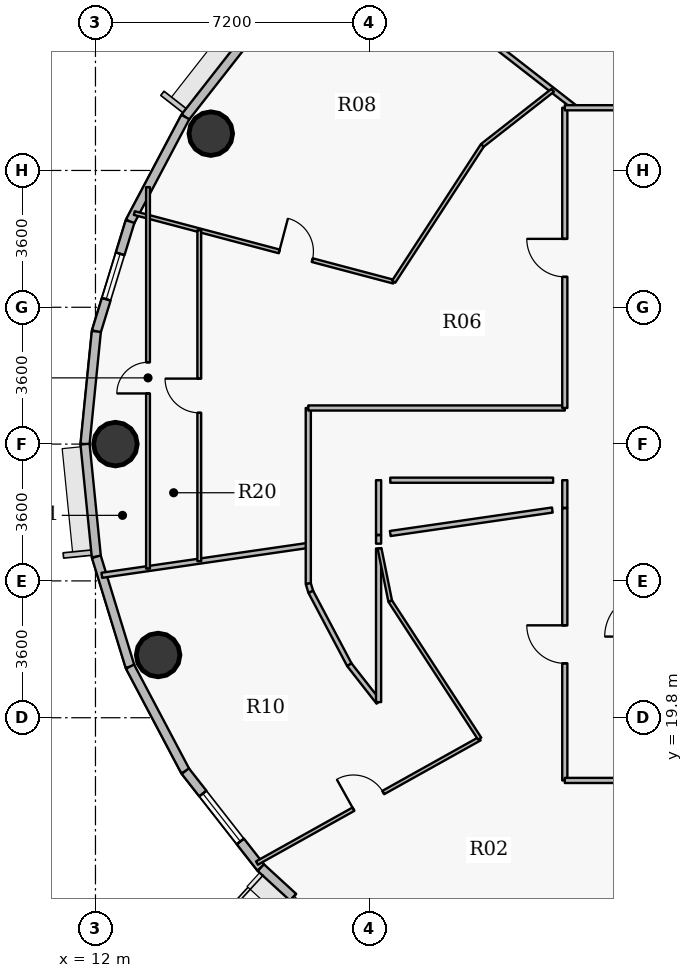
"""IFC4 building model, lengths in metres.
Left out: names, types, materials, properties, quantities, classifications, styles, units other than length and angle.
Written with IfcOpenShell. Run it as: python <this file> out.ifc"""

import sys

from ifc_helpers import new_model, si_unit, direction, frame, frame_2d, origin, origin_2d, place, context, subcontext, project, spatial, rectangle, hollow_circle, extrude, source, transform, mapped, element, fill, save


model = new_model("IFC4")
c1 = context("Model", 3, precision=1e-05, world=origin(), true_north=direction((0.0, 1.0)))
c2 = subcontext(c1, "Body", "Model", "MODEL_VIEW")
j1 = project(units=[si_unit("LENGTHUNIT", "METRE"), si_unit("PLANEANGLEUNIT", "RADIAN")], contexts=[c1])
p1 = place(None, origin())
s1 = spatial("IfcSite", under=j1, at=p1, CompositionType="ELEMENT")
p2 = place(p1, origin())
s2 = spatial("IfcBuilding", under=s1, at=p2, CompositionType="ELEMENT")
p3 = place(p2, frame((0.0, 0.0, 240.3)))
s3 = spatial("IfcBuildingStorey", under=s2, at=p3, CompositionType="ELEMENT", Elevation=240.3)
for number, where, z_axis, x_axis in (
    (1, (15.035, 35.169, 0.0), (0.0, 0.0, 1.0), (1.0, 0.0, 0.0)),
    (2, (12.525, 27.0, 0.0), (0.0, 0.0, 1.0), (1.0, 0.0, 0.0)),
    (3, (13.649, 21.451, 0.0), (0.0, 0.0, 1.0), (1.0, 0.0, 0.0)),
):
    element("IfcColumn", number, at=place(p3, frame(where, z_axis=z_axis, x_axis=x_axis)), inside=s3, PredefinedType="COLUMN", context=c2, shape_type="SweptSolid", body=[
        extrude(hollow_circle(Radius=0.575, WallThickness=0.036, at=origin_2d()), origin(), (0.0, 0.0, 1.0), 3.75),
    ])
p4 = place(p3, frame((14.364, 35.605, 0.0), z_axis=(0.0, 0.0, 1.0), x_axis=(0.616312344705, 0.787501805562, 0.0)))
e4 = element("IfcWall", 4, at=p4, inside=s3, PredefinedType="SOLIDWALL", context=c2, shape_type="SweptSolid", body=[
    extrude(rectangle(XDim=3.225, YDim=0.24, at=frame_2d((1.612, 0.0))), origin(), (0.0, 0.0, 1.0), 3.5),
])
p5 = place(p3, frame((12.91, 32.856, 0.0), z_axis=(0.0, 0.0, 1.0), x_axis=(0.46766049993, 0.883908172157, 0.0)))
e5 = element("IfcWall", 5, at=p5, inside=s3, PredefinedType="SOLIDWALL", context=c2, shape_type="SweptSolid", body=[
    extrude(rectangle(XDim=3.11, YDim=0.24, at=frame_2d((1.555, 0.0))), origin(), (0.0, 0.0, 1.0), 3.5),
])
p6 = place(p3, frame((12.023, 29.964, 0.0), z_axis=(0.0, 0.0, 1.0), x_axis=(0.293132907334, 0.95607170162, 0.0)))
e6 = element("IfcWall", 6, at=p6, inside=s3, PredefinedType="SOLIDWALL", context=c2, shape_type="SweptSolid", body=[
    extrude(rectangle(XDim=3.025, YDim=0.24, at=frame_2d((1.512, 0.0))), origin(), (0.0, 0.0, 1.0), 3.5),
])
p7 = place(p6, frame((0.887, 0.0, 0.9)))
e7 = element("IfcOpeningElement", 7, at=p7, cuts=e6, PredefinedType="OPENING", context=c2, shape_type="SweptSolid", body=[
    extrude(rectangle(XDim=1.25, YDim=1.65, at=origin_2d()), frame((0.625, 0.13, 0.825), z_axis=(0.0, -1.0, 0.0), x_axis=(1.0, 0.0, 0.0)), (0.0, 0.0, 1.0), 0.26),
])
for number, where, z_axis, x_axis in (
    (8, (11.725, 27.0, 0.0), (0.0, 0.0, 1.0), (0.1, 0.995, 0.0)),
    (9, (12.023, 24.036, 0.0), (0.0, 0.0, 1.0), (-0.1, 0.995, 0.0)),
):
    element("IfcWall", number, at=place(p3, frame(where, z_axis=z_axis, x_axis=x_axis)), inside=s3, PredefinedType="SOLIDWALL", context=c2, shape_type="SweptSolid", body=[
        extrude(rectangle(XDim=2.979, YDim=0.24, at=frame_2d((1.489, 0.0))), origin(), (0.0, 0.0, 1.0), 3.5),
    ])
p8 = place(p3, frame((12.91, 21.144, 0.0), z_axis=(0.0, 0.0, 1.0), x_axis=(-0.293132907334, 0.95607170162, 0.0)))
e10 = element("IfcWall", 10, at=p8, inside=s3, PredefinedType="SOLIDWALL", context=c2, shape_type="SweptSolid", body=[
    extrude(rectangle(XDim=3.025, YDim=0.24, at=frame_2d((1.512, 0.0))), origin(), (0.0, 0.0, 1.0), 3.5),
])
p9 = place(p3, frame((14.364, 18.395, 0.0), z_axis=(0.0, 0.0, 1.0), x_axis=(-0.46766049993, 0.883908172157, 0.0)))
e11 = element("IfcWall", 11, at=p9, inside=s3, PredefinedType="SOLIDWALL", context=c2, shape_type="SweptSolid", body=[
    extrude(rectangle(XDim=3.11, YDim=0.24, at=frame_2d((1.555, 0.0))), origin(), (0.0, 0.0, 1.0), 3.5),
])
p10 = place(p3, frame((16.352, 15.855, 0.0), z_axis=(0.0, 0.0, 1.0), x_axis=(-0.616312344705, 0.787501805562, 0.0)))
e12 = element("IfcWall", 12, at=p10, inside=s3, PredefinedType="SOLIDWALL", context=c2, shape_type="SweptSolid", body=[
    extrude(rectangle(XDim=3.225, YDim=0.24, at=frame_2d((1.612, 0.0))), origin(), (0.0, 0.0, 1.0), 3.5),
])
p11 = place(p10, frame((0.876, 0.0, 0.9)))
e13 = element("IfcOpeningElement", 13, at=p11, cuts=e12, PredefinedType="OPENING", context=c2, shape_type="SweptSolid", body=[
    extrude(rectangle(XDim=1.6, YDim=1.75, at=origin_2d()), frame((0.8, 0.13, 0.875), z_axis=(0.0, -1.0, 0.0), x_axis=(1.0, 0.0, 0.0)), (0.0, 0.0, 1.0), 0.26),
])
p12 = place(p3, frame((18.824, 13.589, 0.0), z_axis=(0.0, 0.0, 1.0), x_axis=(-0.737123922599, 0.675757591694, 0.0)))
e14 = element("IfcWall", 14, at=p12, inside=s3, PredefinedType="SOLIDWALL", context=c2, shape_type="SweptSolid", body=[
    extrude(rectangle(XDim=3.354, YDim=0.24, at=frame_2d((1.677, 0.0))), origin(), (0.0, 0.0, 1.0), 3.5),
])
p13 = place(p12, frame((1.152, 0.0, 0.0)))
e15 = element("IfcOpeningElement", 15, at=p13, cuts=e14, PredefinedType="OPENING", context=c2, shape_type="SweptSolid", body=[
    extrude(rectangle(XDim=1.05, YDim=2.15, at=origin_2d()), frame((0.525, 0.13, 1.075), z_axis=(0.0, -1.0, 0.0), x_axis=(1.0, 0.0, 0.0)), (0.0, 0.0, 1.0), 0.26),
])
p14 = place(p3, frame((12.167, 23.548, 0.0), z_axis=(0.0, 0.0, 1.0), x_axis=(0.989672764262, 0.143345106921, 0.0)))
e16 = element("IfcWall", 16, at=p14, inside=s3, PredefinedType="PARTITIONING", context=c2, shape_type="SweptSolid", body=[
    extrude(rectangle(XDim=5.489, YDim=0.135, at=frame_2d((2.745, 0.0))), origin(), (0.0, 0.0, 1.0), 2.985),
])
p15 = place(p3, frame((13.022, 33.079, 0.0), z_axis=(0.0, 0.0, 1.0), x_axis=(0.966904841433, -0.255137272097, 0.0)))
e17 = element("IfcWall", 17, at=p15, inside=s3, PredefinedType="PARTITIONING", context=c2, shape_type="SweptSolid", body=[
    extrude(rectangle(XDim=0.373, YDim=0.1, at=frame_2d((0.187, 0.0))), origin(), (0.0, 0.0, 1.0), 3.5),
])
p16 = place(p3, frame((13.392, 32.981, 0.0), z_axis=(0.0, 0.0, 1.0), x_axis=(0.966739802164, -0.255761910595, 0.0)))
e18 = element("IfcWall", 18, at=p16, inside=s3, PredefinedType="PARTITIONING", context=c2, shape_type="SweptSolid", body=[
    extrude(rectangle(XDim=6.677, YDim=0.1, at=frame_2d((3.339, 0.0))), origin(), (0.0, 0.0, 1.0), 2.985),
])
p17 = place(p16, frame((3.561, 0.0, 0.0)))
e19 = element("IfcOpeningElement", 19, at=p17, cuts=e18, PredefinedType="OPENING", context=c2, shape_type="SweptSolid", body=[
    extrude(rectangle(XDim=0.9, YDim=2.1, at=origin_2d()), frame((0.45, 0.06, 1.05), z_axis=(0.0, -1.0, 0.0), x_axis=(1.0, 0.0, 0.0)), (0.0, 0.0, 1.0), 0.12),
])
p18 = place(p3, frame((13.383, 23.724, 0.0), z_axis=(0.0, 0.0, 1.0), x_axis=(0.0, 1.0, 0.0)))
e20 = element("IfcWall", 20, at=p18, inside=s3, PredefinedType="PARTITIONING", context=c2, shape_type="SweptSolid", body=[
    extrude(rectangle(XDim=10.037, YDim=0.1, at=frame_2d((5.019, 0.0))), origin(), (0.0, 0.0, 1.0), 2.935),
])
p19 = place(p18, frame((4.608, 0.0, 0.0)))
e21 = element("IfcOpeningElement", 21, at=p19, cuts=e20, PredefinedType="OPENING", context=c2, shape_type="SweptSolid", body=[
    extrude(rectangle(XDim=0.82, YDim=2.1, at=origin_2d()), frame((0.41, 0.06, 1.05), z_axis=(0.0, -1.0, 0.0), x_axis=(1.0, 0.0, 0.0)), (0.0, 0.0, 1.0), 0.12),
])
p20 = place(p3, frame((14.732, 23.919, 0.0), z_axis=(0.0, 0.0, 1.0), x_axis=(0.0, 1.0, 0.0)))
e22 = element("IfcWall", 22, at=p20, inside=s3, PredefinedType="PARTITIONING", context=c2, shape_type="SweptSolid", body=[
    extrude(rectangle(XDim=8.708, YDim=0.1, at=frame_2d((4.354, 0.0))), origin(), (0.0, 0.0, 1.0), 2.935),
])
p21 = place(p20, frame((3.904, 0.0, 0.0)))
e23 = element("IfcOpeningElement", 23, at=p21, cuts=e22, PredefinedType="OPENING", context=c2, shape_type="SweptSolid", body=[
    extrude(rectangle(XDim=0.9, YDim=2.1, at=origin_2d()), frame((0.45, 0.06, 1.05), z_axis=(0.0, -1.0, 0.0), x_axis=(1.0, 0.0, 0.0)), (0.0, 0.0, 1.0), 0.12),
])
p22 = place(p3, frame((16.25, 15.977, 0.0), z_axis=(0.0, 0.0, 1.0), x_axis=(0.87319302211, 0.487374543999, 0.0)))
e24 = element("IfcWall", 24, at=p22, inside=s3, PredefinedType="PARTITIONING", context=c2, shape_type="SweptSolid", body=[
    extrude(rectangle(XDim=6.712, YDim=0.1, at=frame_2d((3.356, 0.0))), origin(), (0.0, 0.0, 1.0), 2.985),
])
p23 = place(p22, frame((2.906, 0.0, 0.0)))
e25 = element("IfcOpeningElement", 25, at=p23, cuts=e24, PredefinedType="OPENING", context=c2, shape_type="SweptSolid", body=[
    extrude(rectangle(XDim=0.9, YDim=2.1, at=origin_2d()), frame((0.45, 0.06, 1.05), z_axis=(0.0, -1.0, 0.0), x_axis=(1.0, 0.0, 0.0)), (0.0, 0.0, 1.0), 0.12),
])
p24 = place(p3, frame((17.6, 23.328, 0.0), z_axis=(0.0, 0.0, 1.0), x_axis=(0.0, 1.0, 0.0)))
e26 = element("IfcWall", 26, at=p24, inside=s3, PredefinedType="PARTITIONING", context=c2, shape_type="SweptSolid", body=[
    extrude(rectangle(XDim=4.622, YDim=0.135, at=frame_2d((2.311, 0.0))), origin(), (0.0, 0.0, 1.0), 2.935),
])
p25 = place(p3, frame((17.6, 23.328, 0.0), z_axis=(0.0, 0.0, 1.0), x_axis=(0.292875000845, -0.956150738053, 0.0)))
e27 = element("IfcWall", 27, at=p25, inside=s3, PredefinedType="PARTITIONING", context=c2, shape_type="SweptSolid", body=[
    extrude(rectangle(XDim=0.227, YDim=0.135, at=frame_2d((0.113, 0.0))), origin(), (0.0, 0.0, 1.0), 3.5),
])
p26 = place(p3, frame((17.6, 27.95, 0.0), z_axis=(0.0, 0.0, 1.0), x_axis=(1.0, 0.0, 0.0)))
e28 = element("IfcWall", 28, at=p26, inside=s3, PredefinedType="PARTITIONING", context=c2, shape_type="SweptSolid", body=[
    extrude(rectangle(XDim=6.75, YDim=0.135, at=frame_2d((3.375, 0.0))), origin(), (0.0, 0.0, 1.0), 3.5),
])
p27 = place(p3, frame((17.667, 23.111, 0.0), z_axis=(0.0, 0.0, 1.0), x_axis=(0.467675622269, -0.883900171024, 0.0)))
e29 = element("IfcWall", 29, at=p27, inside=s3, PredefinedType="PARTITIONING", context=c2, shape_type="SweptSolid", body=[
    extrude(rectangle(XDim=2.168, YDim=0.135, at=frame_2d((1.084, 0.0))), origin(), (0.0, 0.0, 1.0), 2.935),
])
p28 = place(p3, frame((18.681, 21.194, 0.0), z_axis=(0.0, 0.0, 1.0), x_axis=(0.616239706802, -0.787558647823, 0.0)))
e30 = element("IfcWall", 30, at=p28, inside=s3, PredefinedType="PARTITIONING", context=c2, shape_type="SweptSolid", body=[
    extrude(rectangle(XDim=1.248, YDim=0.135, at=frame_2d((0.624, 0.0))), origin(), (0.0, 0.0, 1.0), 3.5),
])
p29 = place(p3, frame((18.791, 40.387, 0.0), z_axis=(0.0, 0.0, 1.0), x_axis=(0.789302404173, -0.614004653701, 0.0)))
e31 = element("IfcWall", 31, at=p29, inside=s3, PredefinedType="PARTITIONING", context=c2, shape_type="SweptSolid", body=[
    extrude(rectangle(XDim=7.39, YDim=0.135, at=frame_2d((3.695, 0.0))), origin(), (0.0, 0.0, 1.0), 2.935),
])
p30 = place(p3, frame((19.45, 20.211, 0.0), z_axis=(0.0, 0.0, 1.0), x_axis=(0.0, 1.0, 0.0)))
e32 = element("IfcWall", 32, at=p30, inside=s3, PredefinedType="PARTITIONING", context=c2, shape_type="SweptSolid", body=[
    extrude(rectangle(XDim=4.042, YDim=0.135, at=frame_2d((2.021, 0.0))), origin(), (0.0, 0.0, 1.0), 2.935),
])
p31 = place(p3, frame((19.45, 24.38, 0.0), z_axis=(0.0, 0.0, 1.0), x_axis=(0.0, 1.0, 0.0)))
e33 = element("IfcWall", 33, at=p31, inside=s3, PredefinedType="PARTITIONING", context=c2, shape_type="SweptSolid", body=[
    extrude(rectangle(XDim=0.223, YDim=0.135, at=frame_2d((0.111, 0.0))), origin(), (0.0, 0.0, 1.0), 3.5),
])
p32 = place(p3, frame((19.475, 24.256, 0.0), z_axis=(0.0, 0.0, 1.0), x_axis=(0.198203790622, -0.980160832406, 0.0)))
e34 = element("IfcWall", 34, at=p32, inside=s3, PredefinedType="PARTITIONING", context=c2, shape_type="SweptSolid", body=[
    extrude(rectangle(XDim=1.417, YDim=0.1, at=frame_2d((0.708, 0.0))), origin(), (0.0, 0.0, 1.0), 2.935),
])
p33 = place(p3, frame((19.756, 22.867, 0.0), z_axis=(0.0, 0.0, 1.0), x_axis=(0.545441385955, -0.83814896915, 0.0)))
e35 = element("IfcWall", 35, at=p33, inside=s3, PredefinedType="PARTITIONING", context=c2, shape_type="SweptSolid", body=[
    extrude(rectangle(XDim=4.318, YDim=0.1, at=frame_2d((2.159, 0.0))), origin(), (0.0, 0.0, 1.0), 2.935),
])
p34 = place(p3, frame((19.847, 31.273, 0.0), z_axis=(0.0, 0.0, 1.0), x_axis=(0.545399280946, 0.83817636828, 0.0)))
e36 = element("IfcWall", 36, at=p34, inside=s3, PredefinedType="PARTITIONING", context=c2, shape_type="SweptSolid", body=[
    extrude(rectangle(XDim=4.28, YDim=0.1, at=frame_2d((2.14, 0.0))), origin(), (0.0, 0.0, 1.0), 2.935),
])
p35 = place(p3, frame((22.182, 34.861, 0.0), z_axis=(0.0, 0.0, 1.0), x_axis=(0.78737344739, 0.616476320994, 0.0)))
e37 = element("IfcWall", 37, at=p35, inside=s3, PredefinedType="PARTITIONING", context=c2, shape_type="SweptSolid", body=[
    extrude(rectangle(XDim=2.35, YDim=0.1, at=frame_2d((1.175, 0.0))), origin(), (0.0, 0.0, 1.0), 2.935),
])
p36 = place(p3, frame((22.747, 11.154, 0.0), z_axis=(0.0, 0.0, 1.0), x_axis=(0.641565789242, 0.767068013982, 0.0)))
e38 = element("IfcWall", 38, at=p36, inside=s3, PredefinedType="PARTITIONING", context=c2, shape_type="SweptSolid", body=[
    extrude(rectangle(XDim=6.167, YDim=0.1, at=frame_2d((3.083, 0.0))), origin(), (0.0, 0.0, 1.0), 2.985),
])
p37 = place(p36, frame((2.633, 0.0, 0.0)))
e39 = element("IfcOpeningElement", 39, at=p37, cuts=e38, PredefinedType="OPENING", context=c2, shape_type="SweptSolid", body=[
    extrude(rectangle(XDim=0.9, YDim=2.1, at=origin_2d()), frame((0.45, 0.06, 1.05), z_axis=(0.0, -1.0, 0.0), x_axis=(1.0, 0.0, 0.0)), (0.0, 0.0, 1.0), 0.12),
])
p38 = place(p3, frame((24.35, 18.15, 0.0), z_axis=(0.0, 0.0, 1.0), x_axis=(0.0, 1.0, 0.0)))
e40 = element("IfcWall", 40, at=p38, inside=s3, PredefinedType="PARTITIONING", context=c2, shape_type="SweptSolid", body=[
    extrude(rectangle(XDim=7.163, YDim=0.135, at=frame_2d((3.581, 0.0))), origin(), (0.0, 0.0, 1.0), 2.935),
])
p39 = place(p38, frame((3.081, 0.0, 0.0)))
e41 = element("IfcOpeningElement", 41, at=p39, cuts=e40, PredefinedType="OPENING", context=c2, shape_type="SweptSolid", body=[
    extrude(rectangle(XDim=1.0, YDim=2.15, at=origin_2d()), frame((0.5, 0.078, 1.075), z_axis=(0.0, -1.0, 0.0), x_axis=(1.0, 0.0, 0.0)), (0.0, 0.0, 1.0), 0.155),
])
p40 = place(p3, frame((24.35, 18.15, 0.0), z_axis=(0.0, 0.0, 1.0), x_axis=(1.0, 0.0, 0.0)))
e42 = element("IfcWall", 42, at=p40, inside=s3, PredefinedType="PARTITIONING", context=c2, shape_type="SweptSolid", body=[
    extrude(rectangle(XDim=23.85, YDim=0.135, at=frame_2d((11.925, 0.0))), origin(), (0.0, 0.0, 1.0), 2.935),
])
p41 = place(p40, frame((14.838, 0.0, 0.0)))
e43 = element("IfcOpeningElement", 43, at=p41, cuts=e42, PredefinedType="OPENING", context=c2, shape_type="SweptSolid", body=[
    extrude(rectangle(XDim=1.0, YDim=2.15, at=origin_2d()), frame((0.5, 0.078, 1.075), z_axis=(0.0, -1.0, 0.0), x_axis=(1.0, 0.0, 0.0)), (0.0, 0.0, 1.0), 0.155),
])
p42 = place(p40, frame((21.472, 0.0, 0.0)))
e44 = element("IfcOpeningElement", 44, at=p42, cuts=e42, PredefinedType="OPENING", context=c2, shape_type="SweptSolid", body=[
    extrude(rectangle(XDim=1.0, YDim=2.15, at=origin_2d()), frame((0.5, 0.078, 1.075), z_axis=(0.0, -1.0, 0.0), x_axis=(1.0, 0.0, 0.0)), (0.0, 0.0, 1.0), 0.155),
])
p43 = place(p3, frame((24.35, 27.95, 0.0), z_axis=(0.0, 0.0, 1.0), x_axis=(0.0, 1.0, 0.0)))
e45 = element("IfcWall", 45, at=p43, inside=s3, PredefinedType="PARTITIONING", context=c2, shape_type="SweptSolid", body=[
    extrude(rectangle(XDim=7.9, YDim=0.135, at=frame_2d((3.95, 0.0))), origin(), (0.0, 0.0, 1.0), 2.935),
])
p44 = place(p43, frame((3.45, 0.0, 0.0)))
e46 = element("IfcOpeningElement", 46, at=p44, cuts=e45, PredefinedType="OPENING", context=c2, shape_type="SweptSolid", body=[
    extrude(rectangle(XDim=1.0, YDim=2.15, at=origin_2d()), frame((0.5, 0.078, 1.075), z_axis=(0.0, -1.0, 0.0), x_axis=(1.0, 0.0, 0.0)), (0.0, 0.0, 1.0), 0.155),
])
p45 = place(p3, frame((24.35, 35.85, 0.0), z_axis=(0.0, 0.0, 1.0), x_axis=(1.0, 0.0, 0.0)))
e47 = element("IfcWall", 47, at=p45, inside=s3, PredefinedType="PARTITIONING", context=c2, shape_type="SweptSolid", body=[
    extrude(rectangle(XDim=26.218, YDim=0.135, at=frame_2d((13.109, 0.0))), origin(), (0.0, 0.0, 1.0), 2.935),
])
p46 = place(p45, frame((3.172, 0.0, 0.0)))
e48 = element("IfcOpeningElement", 48, at=p46, cuts=e47, PredefinedType="OPENING", context=c2, shape_type="SweptSolid", body=[
    extrude(rectangle(XDim=1.0, YDim=2.15, at=origin_2d()), frame((0.5, 0.078, 1.075), z_axis=(0.0, -1.0, 0.0), x_axis=(1.0, 0.0, 0.0)), (0.0, 0.0, 1.0), 0.155),
])
p47 = place(p45, frame((18.306, 0.0, 0.0)))
e49 = element("IfcOpeningElement", 49, at=p47, cuts=e47, PredefinedType="OPENING", context=c2, shape_type="SweptSolid", body=[
    extrude(rectangle(XDim=1.0, YDim=2.15, at=origin_2d()), frame((0.5, 0.078, 1.075), z_axis=(0.0, -1.0, 0.0), x_axis=(1.0, 0.0, 0.0)), (0.0, 0.0, 1.0), 0.155),
])
p48 = place(p3, frame((19.45, 26.05, 0.0), z_axis=(0.0, 0.0, 1.0), x_axis=(0.0, -1.0, 0.0)))
e50 = element("IfcWall", 50, at=p48, inside=s3, PredefinedType="PARTITIONING", context=c2, shape_type="SweptSolid", body=[
    extrude(rectangle(XDim=1.437, YDim=0.135, at=frame_2d((0.719, 0.0))), origin(), (0.0, 0.0, 1.0), 3.5),
])
p49 = place(p3, frame((24.35, 25.323, 0.0), z_axis=(0.0, 0.0, 1.0), x_axis=(0.0, 1.0, 0.0)))
e51 = element("IfcWall", 51, at=p49, inside=s3, PredefinedType="PARTITIONING", context=c2, shape_type="SweptSolid", body=[
    extrude(rectangle(XDim=0.728, YDim=0.135, at=frame_2d((0.364, 0.0))), origin(), (0.0, 0.0, 1.0), 3.5),
])
p50 = place(p3, frame((24.042, 26.05, 0.0), z_axis=(0.0, 0.0, 1.0), x_axis=(-1.0, 0.0, 0.0)))
e52 = element("IfcWall", 52, at=p50, inside=s3, PredefinedType="PARTITIONING", context=c2, shape_type="SweptSolid", body=[
    extrude(rectangle(XDim=4.285, YDim=0.135, at=frame_2d((2.143, 0.0))), origin(), (0.0, 0.0, 1.0), 3.5),
])
p51 = place(p3, frame((19.758, 24.647, 0.0), z_axis=(0.0, 0.0, 1.0), x_axis=(0.989666541967, 0.143388059861, 0.0)))
e53 = element("IfcWall", 53, at=p51, inside=s3, PredefinedType="PARTITIONING", context=c2, shape_type="SweptSolid", body=[
    extrude(rectangle(XDim=4.309, YDim=0.135, at=frame_2d((2.155, 0.0))), origin(), (0.0, 0.0, 1.0), 3.5),
])
m1 = source(origin(), c2, "Body", "SweptSolid", [
    extrude(rectangle(XDim=1.25, YDim=1.65, at=origin_2d()), frame((0.625, 0.03, 0.825), z_axis=(0.0, -1.0, 0.0), x_axis=(1.0, 0.0, 0.0)), (0.0, 0.0, 1.0), 0.06),
])
p52 = place(p7, origin())
e54 = element("IfcWindow", 54, at=p52, inside=s3, PartitioningType="SINGLE_PANEL", PredefinedType="WINDOW", context=c2, shape_type="MappedRepresentation", body=[
    mapped(m1, transform((0.0, 0.0, 0.0), x_axis=(1.0, 0.0, 0.0), y_axis=(0.0, 1.0, 0.0), z_axis=(0.0, 0.0, 1.0), scale=1.0)),
])
fill(e7, e54)
m2 = source(origin(), c2, "Body", "SweptSolid", [
    extrude(rectangle(XDim=1.6, YDim=1.75, at=origin_2d()), frame((0.8, 0.03, 0.875), z_axis=(0.0, -1.0, 0.0), x_axis=(1.0, 0.0, 0.0)), (0.0, 0.0, 1.0), 0.06),
])
p53 = place(p11, origin())
e55 = element("IfcWindow", 55, at=p53, inside=s3, PartitioningType="DOUBLE_PANEL_VERTICAL", PredefinedType="WINDOW", context=c2, shape_type="MappedRepresentation", body=[
    mapped(m2, transform((0.0, 0.0, 0.0), x_axis=(1.0, 0.0, 0.0), y_axis=(0.0, 1.0, 0.0), z_axis=(0.0, 0.0, 1.0), scale=1.0)),
])
fill(e13, e55)
m3 = source(origin(), c2, "Body", "SweptSolid", [
    extrude(rectangle(XDim=1.05, YDim=2.15, at=origin_2d()), frame((0.525, 0.025, 1.075), z_axis=(0.0, -1.0, 0.0), x_axis=(1.0, 0.0, 0.0)), (0.0, 0.0, 1.0), 0.05),
])
p54 = place(p13, origin())
e56 = element("IfcDoor", 56, at=p54, inside=s3, OperationType="SINGLE_SWING_LEFT", PredefinedType="DOOR", context=c2, shape_type="MappedRepresentation", body=[
    mapped(m3, transform((0.0, 0.0, 0.0), x_axis=(1.0, 0.0, 0.0), y_axis=(0.0, 1.0, 0.0), z_axis=(0.0, 0.0, 1.0), scale=1.0)),
])
fill(e15, e56)
m4 = source(origin(), c2, "Body", "SweptSolid", [
    extrude(rectangle(XDim=1.0, YDim=2.15, at=origin_2d()), frame((0.5, 0.025, 1.075), z_axis=(0.0, -1.0, 0.0), x_axis=(1.0, 0.0, 0.0)), (0.0, 0.0, 1.0), 0.05),
])
p55 = place(p44, origin())
e57 = element("IfcDoor", 57, at=p55, inside=s3, OperationType="SINGLE_SWING_RIGHT", PredefinedType="DOOR", context=c2, shape_type="MappedRepresentation", body=[
    mapped(m4, transform((0.0, 0.0, 0.0), x_axis=(1.0, 0.0, 0.0), y_axis=(0.0, 1.0, 0.0), z_axis=(0.0, 0.0, 1.0), scale=1.0)),
])
fill(e46, e57)
m5 = source(origin(), c2, "Body", "SweptSolid", [
    extrude(rectangle(XDim=0.9, YDim=2.1, at=origin_2d()), frame((0.45, 0.025, 1.05), z_axis=(0.0, -1.0, 0.0), x_axis=(1.0, 0.0, 0.0)), (0.0, 0.0, 1.0), 0.05),
])
p56 = place(p17, origin())
e58 = element("IfcDoor", 58, at=p56, inside=s3, OperationType="SINGLE_SWING_LEFT", PredefinedType="DOOR", context=c2, shape_type="MappedRepresentation", body=[
    mapped(m5, transform((0.0, 0.0, 0.0), x_axis=(1.0, 0.0, 0.0), y_axis=(0.0, 1.0, 0.0), z_axis=(0.0, 0.0, 1.0), scale=1.0)),
])
fill(e19, e58)
p57 = place(p21, origin())
e59 = element("IfcDoor", 59, at=p57, inside=s3, OperationType="SINGLE_SWING_RIGHT", PredefinedType="DOOR", context=c2, shape_type="MappedRepresentation", body=[
    mapped(m5, transform((0.0, 0.0, 0.0), x_axis=(1.0, 0.0, 0.0), y_axis=(0.0, 1.0, 0.0), z_axis=(0.0, 0.0, 1.0), scale=1.0)),
])
fill(e23, e59)
m6 = source(origin(), c2, "Body", "SweptSolid", [
    extrude(rectangle(XDim=0.82, YDim=2.1, at=origin_2d()), frame((0.41, 0.025, 1.05), z_axis=(0.0, -1.0, 0.0), x_axis=(1.0, 0.0, 0.0)), (0.0, 0.0, 1.0), 0.05),
])
p58 = place(p19, origin())
e60 = element("IfcDoor", 60, at=p58, inside=s3, OperationType="SINGLE_SWING_LEFT", PredefinedType="DOOR", context=c2, shape_type="MappedRepresentation", body=[
    mapped(m6, transform((0.0, 0.0, 0.0), x_axis=(1.0, 0.0, 0.0), y_axis=(0.0, 1.0, 0.0), z_axis=(0.0, 0.0, 1.0), scale=1.0)),
])
fill(e21, e60)
p59 = place(p39, origin())
e61 = element("IfcDoor", 61, at=p59, inside=s3, OperationType="SINGLE_SWING_RIGHT", PredefinedType="DOOR", context=c2, shape_type="MappedRepresentation", body=[
    mapped(m4, transform((0.0, 0.0, 0.0), x_axis=(1.0, 0.0, 0.0), y_axis=(0.0, 1.0, 0.0), z_axis=(0.0, 0.0, 1.0), scale=1.0)),
])
fill(e41, e61)
p60 = place(p23, origin())
e62 = element("IfcDoor", 62, at=p60, inside=s3, OperationType="SINGLE_SWING_LEFT", PredefinedType="DOOR", context=c2, shape_type="MappedRepresentation", body=[
    mapped(m5, transform((0.0, 0.0, 0.0), x_axis=(1.0, 0.0, 0.0), y_axis=(0.0, 1.0, 0.0), z_axis=(0.0, 0.0, 1.0), scale=1.0)),
])
fill(e25, e62)
save(model, sys.argv[1])
